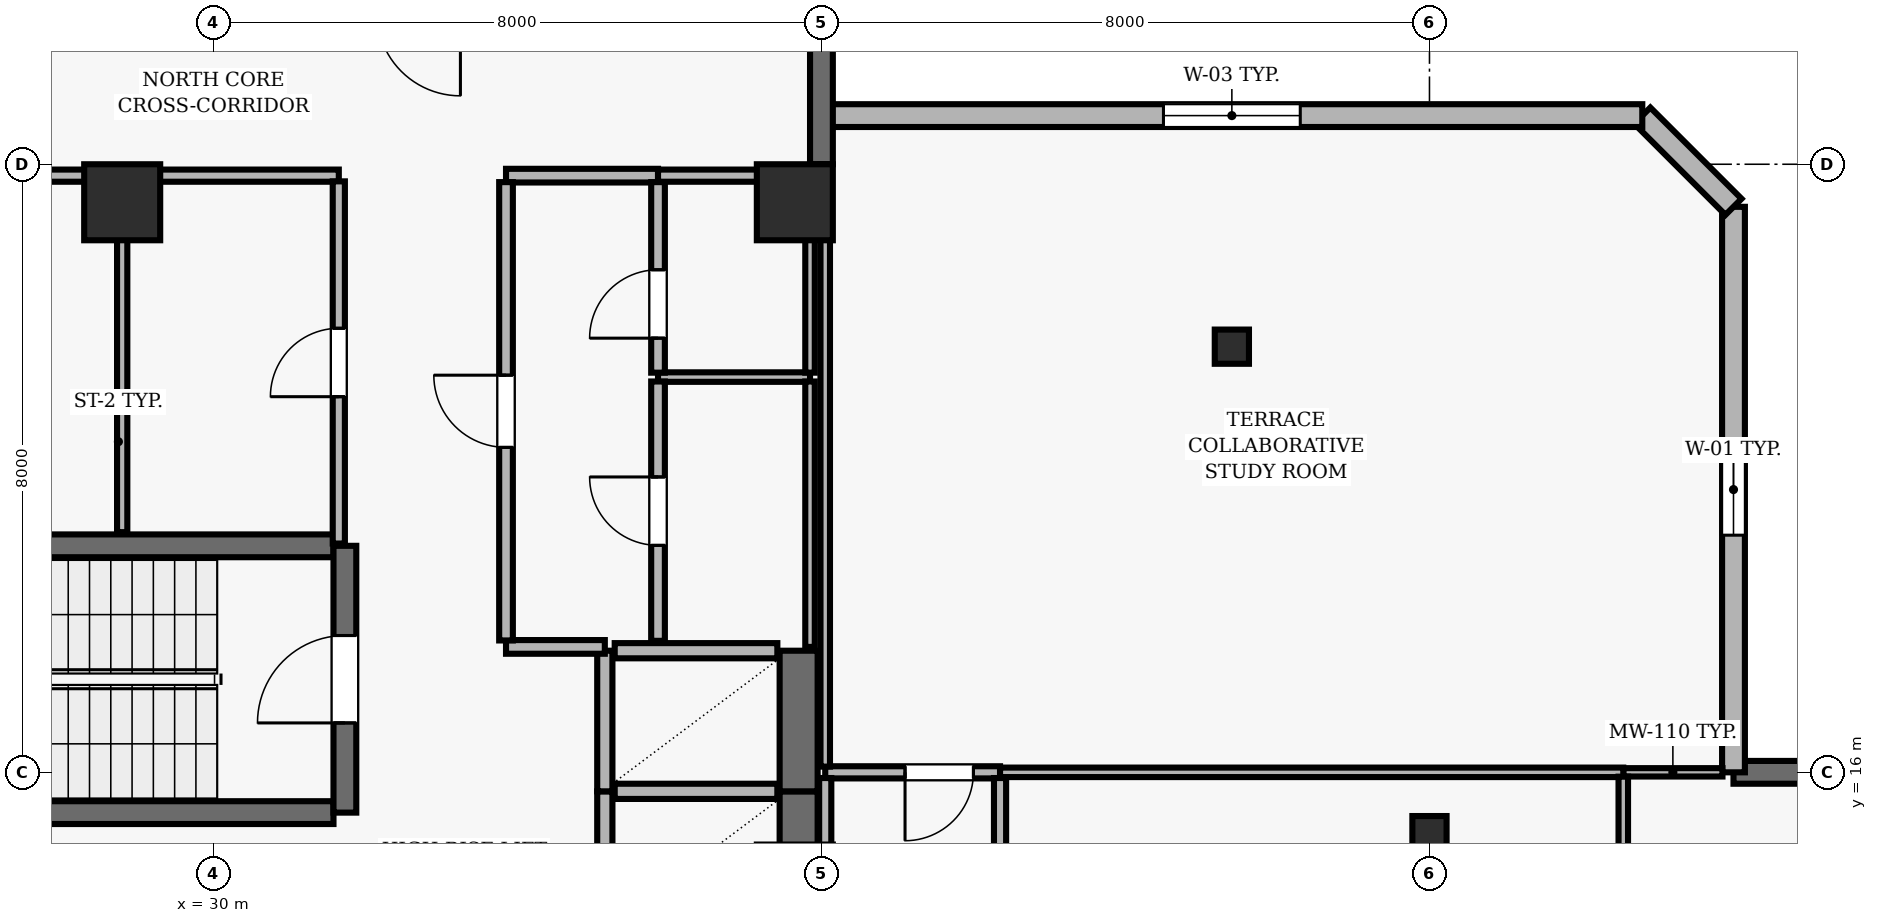
"""IFC4 building model, lengths in metres.
Left out: names, types, materials, properties, quantities, classifications, styles, units other than length and angle.
Written with IfcOpenShell. Run it as: python <this file> out.ifc"""

import sys

from ifc_helpers import new_model, si_unit, direction, frame, frame_2d, origin, origin_2d, place, context, subcontext, project, spatial, rectangle, hollow_rectangle, extrude, element, fill, save


model = new_model("IFC4")
c1 = context("Model", 3, precision=1e-05, world=origin(), true_north=direction((0.0, 1.0)))
c2 = subcontext(c1, "Body", "Model", "MODEL_VIEW")
j1 = project(units=[si_unit("LENGTHUNIT", "METRE"), si_unit("PLANEANGLEUNIT", "RADIAN")], contexts=[c1])
p1 = place(None, origin())
s1 = spatial("IfcSite", under=j1, at=p1, CompositionType="ELEMENT")
p2 = place(p1, origin())
s2 = spatial("IfcBuilding", under=s1, at=p2, CompositionType="ELEMENT")
p3 = place(p2, frame((0.0, 0.0, 179.7)))
s3 = spatial("IfcBuildingStorey", under=s2, at=p3, CompositionType="ELEMENT", Elevation=179.7)
for number, where, z_axis, x_axis in (
    (1, (28.8, 23.5, 0.0), (0.0, 0.0, 1.0), (1.0, 0.0, 0.0)),
    (2, (37.65, 23.5, 0.0), (0.0, 0.0, 1.0), (1.0, 0.0, 0.0)),
):
    element("IfcColumn", number, at=place(p3, frame(where, z_axis=z_axis, x_axis=x_axis)), inside=s3, PredefinedType="COLUMN", context=c2, shape_type="SweptSolid", body=[
        extrude(rectangle(XDim=1.0, YDim=1.0, at=origin_2d()), origin(), (0.0, 0.0, 1.0), 3.9),
    ])
for number, where, z_axis, x_axis in (
    (3, (46.0, 15.2, 0.0), (0.0, 0.0, 1.0), (1.0, 0.0, 0.0)),
    (4, (43.4, 21.6, 0.0), (0.0, 0.0, 1.0), (1.0, 0.0, 0.0)),
):
    element("IfcColumn", number, at=place(p3, frame(where, z_axis=z_axis, x_axis=x_axis)), inside=s3, PredefinedType="COLUMN", context=c2, shape_type="SweptSolid", body=[
        extrude(hollow_rectangle(XDim=0.45, YDim=0.45, WallThickness=0.02, at=origin_2d()), origin(), (0.0, 0.0, 1.0), 3.9),
    ])
p4 = place(p3, frame((62.7, 16.0, 0.0), z_axis=(0.0, 0.0, 1.0), x_axis=(-1.0, 0.0, 0.0)))
e5 = element("IfcWall", 5, at=p4, inside=s3, PredefinedType="SOLIDWALL", context=c2, shape_type="SweptSolid", body=[
    extrude(rectangle(XDim=12.7, YDim=0.3, at=frame_2d((6.35, 0.0))), origin(), (0.0, 0.0, 1.0), 3.69),
])
p5 = place(p4, frame((6.85, 0.0, 0.0)))
e6 = element("IfcOpeningElement", 6, at=p5, cuts=e5, PredefinedType="OPENING", context=c2, shape_type="SweptSolid", body=[
    extrude(rectangle(XDim=1.0, YDim=2.2, at=frame_2d((0.5, 1.1))), frame((0.0, 0.16, 0.0), z_axis=(0.0, -1.0, 0.0), x_axis=(1.0, 0.0, 0.0)), (0.0, 0.0, 1.0), 0.32),
])
p6 = place(p4, frame((1.225, 0.0, 0.9)))
e7 = element("IfcOpeningElement", 7, at=p6, cuts=e5, PredefinedType="OPENING", context=c2, shape_type="SweptSolid", body=[
    extrude(rectangle(XDim=3.0, YDim=2.2, at=frame_2d((1.5, 1.1))), frame((0.0, 0.16, 0.0), z_axis=(0.0, -1.0, 0.0), x_axis=(1.0, 0.0, 0.0)), (0.0, 0.0, 1.0), 0.32),
])
p7 = place(p4, frame((8.475, 0.0, 0.9)))
e8 = element("IfcOpeningElement", 8, at=p7, cuts=e5, PredefinedType="OPENING", context=c2, shape_type="SweptSolid", body=[
    extrude(rectangle(XDim=3.0, YDim=2.2, at=frame_2d((1.5, 1.1))), frame((0.0, 0.16, 0.0), z_axis=(0.0, -1.0, 0.0), x_axis=(1.0, 0.0, 0.0)), (0.0, 0.0, 1.0), 0.32),
])
p8 = place(p3, frame((50.0, 16.0, 0.0), z_axis=(0.0, 0.0, 1.0), x_axis=(0.0, 1.0, 0.0)))
e9 = element("IfcWall", 9, at=p8, inside=s3, PredefinedType="SOLIDWALL", context=c2, shape_type="SweptSolid", body=[
    extrude(rectangle(XDim=7.44, YDim=0.3, at=frame_2d((3.72, 0.0))), origin(), (0.0, 0.0, 1.0), 3.69),
])
p9 = place(p8, frame((3.12, 0.0, 0.9)))
e10 = element("IfcOpeningElement", 10, at=p9, cuts=e9, PredefinedType="OPENING", context=c2, shape_type="SweptSolid", body=[
    extrude(rectangle(XDim=1.2, YDim=1.6, at=frame_2d((0.6, 0.8))), frame((0.0, 0.16, 0.0), z_axis=(0.0, -1.0, 0.0), x_axis=(1.0, 0.0, 0.0)), (0.0, 0.0, 1.0), 0.32),
])
p10 = place(p3, frame((50.0, 23.44, 0.0), z_axis=(0.0, 0.0, 1.0), x_axis=(-0.707106781187, 0.707106781187, 0.0)))
e11 = element("IfcWall", 11, at=p10, inside=s3, PredefinedType="SOLIDWALL", context=c2, shape_type="SweptSolid", body=[
    extrude(rectangle(XDim=1.697, YDim=0.3, at=frame_2d((0.849, 0.0))), origin(), (0.0, 0.0, 1.0), 3.69),
])
p11 = place(p3, frame((48.8, 24.64, 0.0), z_axis=(0.0, 0.0, 1.0), x_axis=(-1.0, 0.0, 0.0)))
e12 = element("IfcWall", 12, at=p11, inside=s3, PredefinedType="SOLIDWALL", context=c2, shape_type="SweptSolid", body=[
    extrude(rectangle(XDim=10.8, YDim=0.3, at=frame_2d((5.4, 0.0))), origin(), (0.0, 0.0, 1.0), 3.69),
])
p12 = place(p11, frame((4.5, 0.0, 0.9)))
e13 = element("IfcOpeningElement", 13, at=p12, cuts=e12, PredefinedType="OPENING", context=c2, shape_type="SweptSolid", body=[
    extrude(rectangle(XDim=1.8, YDim=1.6, at=frame_2d((0.9, 0.8))), frame((0.0, 0.16, 0.0), z_axis=(0.0, -1.0, 0.0), x_axis=(1.0, 0.0, 0.0)), (0.0, 0.0, 1.0), 0.32),
])
p13 = place(p3, frame((38.0, 24.0, 0.0), z_axis=(0.0, 0.0, 1.0), x_axis=(0.0, 1.0, 0.0)))
e14 = element("IfcWall", 14, at=p13, inside=s3, PredefinedType="SOLIDWALL", context=c2, shape_type="SweptSolid", body=[
    extrude(rectangle(XDim=16.7, YDim=0.3, at=frame_2d((8.35, 0.0))), origin(), (0.0, 0.0, 1.0), 3.69),
])
p14 = place(p13, frame((2.03, 0.0, 0.0)))
e15 = element("IfcOpeningElement", 15, at=p14, cuts=e14, PredefinedType="OPENING", context=c2, shape_type="SweptSolid", body=[
    extrude(rectangle(XDim=1.0, YDim=2.2, at=frame_2d((0.5, 1.1))), frame((0.0, 0.16, 0.0), z_axis=(0.0, -1.0, 0.0), x_axis=(1.0, 0.0, 0.0)), (0.0, 0.0, 1.0), 0.32),
])
for number, where, z_axis, x_axis in (
    (16, (31.58, 18.98, 0.0), (0.0, 0.0, 1.0), (-1.0, 0.0, 0.0)),
    (17, (23.22, 15.47, 0.0), (0.0, 0.0, 1.0), (1.0, 0.0, 0.0)),
):
    element("IfcWall", number, at=place(p3, frame(where, z_axis=z_axis, x_axis=x_axis)), inside=s3, PredefinedType="SHEAR", context=c2, shape_type="SweptSolid", body=[
        extrude(rectangle(XDim=8.36, YDim=0.3, at=frame_2d((4.18, 0.0))), origin(), (0.0, 0.0, 1.0), 3.69),
    ])
p15 = place(p3, frame((31.73, 15.47, 0.0), z_axis=(0.0, 0.0, 1.0), x_axis=(0.0, 1.0, 0.0)))
e18 = element("IfcWall", 18, at=p15, inside=s3, PredefinedType="SHEAR", context=c2, shape_type="SweptSolid", body=[
    extrude(rectangle(XDim=3.51, YDim=0.3, at=frame_2d((1.755, 0.0))), origin(), (0.0, 0.0, 1.0), 3.69),
])
p16 = place(p15, frame((1.18, 0.0, 0.0)))
e19 = element("IfcOpeningElement", 19, at=p16, cuts=e18, PredefinedType="OPENING", context=c2, shape_type="SweptSolid", body=[
    extrude(rectangle(XDim=1.15, YDim=2.15, at=frame_2d((0.575, 1.075))), frame((0.0, 0.16, 0.0), z_axis=(0.0, -1.0, 0.0), x_axis=(1.0, 0.0, 0.0)), (0.0, 0.0, 1.0), 0.32),
])
p17 = place(p3, frame((35.15, 15.75, 0.0), z_axis=(0.0, 0.0, 1.0), x_axis=(0.0, -1.0, 0.0)))
e20 = element("IfcWall", 20, at=p17, inside=s3, PredefinedType="SOLIDWALL", context=c2, shape_type="SweptSolid", body=[
    extrude(rectangle(XDim=1.85, YDim=0.2, at=frame_2d((0.925, 0.0))), origin(), (0.0, 0.0, 1.0), 3.69),
])
p18 = place(p3, frame((37.7, 13.9, 0.0), z_axis=(0.0, 0.0, 1.0), x_axis=(0.0, 1.0, 0.0)))
e21 = element("IfcWall", 21, at=p18, inside=s3, PredefinedType="SHEAR", context=c2, shape_type="SweptSolid", body=[
    extrude(rectangle(XDim=1.85, YDim=0.5, at=frame_2d((0.925, 0.0))), origin(), (0.0, 0.0, 1.0), 3.69),
])
p19 = place(p3, frame((37.42, 15.75, 0.0), z_axis=(0.0, 0.0, 1.0), x_axis=(-1.0, 0.0, 0.0)))
e22 = element("IfcWall", 22, at=p19, inside=s3, PredefinedType="SOLIDWALL", context=c2, shape_type="SweptSolid", body=[
    extrude(rectangle(XDim=2.14, YDim=0.2, at=frame_2d((1.07, 0.0))), origin(), (0.0, 0.0, 1.0), 3.69),
])
p20 = place(p3, frame((35.15, 17.6, 0.0), z_axis=(0.0, 0.0, 1.0), x_axis=(0.0, -1.0, 0.0)))
e23 = element("IfcWall", 23, at=p20, inside=s3, PredefinedType="SOLIDWALL", context=c2, shape_type="SweptSolid", body=[
    extrude(rectangle(XDim=1.85, YDim=0.2, at=frame_2d((0.925, 0.0))), origin(), (0.0, 0.0, 1.0), 3.69),
])
p21 = place(p3, frame((37.7, 15.75, 0.0), z_axis=(0.0, 0.0, 1.0), x_axis=(0.0, 1.0, 0.0)))
e24 = element("IfcWall", 24, at=p21, inside=s3, PredefinedType="SHEAR", context=c2, shape_type="SweptSolid", body=[
    extrude(rectangle(XDim=1.85, YDim=0.5, at=frame_2d((0.925, 0.0))), origin(), (0.0, 0.0, 1.0), 3.69),
])
p22 = place(p3, frame((37.42, 17.6, 0.0), z_axis=(0.0, 0.0, 1.0), x_axis=(-1.0, 0.0, 0.0)))
e25 = element("IfcWall", 25, at=p22, inside=s3, PredefinedType="SOLIDWALL", context=c2, shape_type="SweptSolid", body=[
    extrude(rectangle(XDim=2.14, YDim=0.2, at=frame_2d((1.07, 0.0))), origin(), (0.0, 0.0, 1.0), 3.69),
])
p23 = place(p3, frame((28.8, 23.85, 0.0), z_axis=(0.0, 0.0, 1.0), x_axis=(-1.0, 0.0, 0.0)))
e26 = element("IfcWall", 26, at=p23, inside=s3, PredefinedType="PARTITIONING", context=c2, shape_type="SweptSolid", body=[
    extrude(rectangle(XDim=6.6, YDim=0.16, at=frame_2d((3.3, 0.0))), origin(), (0.0, 0.0, 1.0), 3.146),
])
p24 = place(p23, frame((2.86, 0.0, 0.0)))
e27 = element("IfcOpeningElement", 27, at=p24, cuts=e26, PredefinedType="OPENING", context=c2, shape_type="SweptSolid", body=[
    extrude(rectangle(XDim=0.88, YDim=2.1, at=frame_2d((0.44, 1.05))), frame((0.0, 0.09, 0.0), z_axis=(0.0, -1.0, 0.0), x_axis=(1.0, 0.0, 0.0)), (0.0, 0.0, 1.0), 0.18),
])
p25 = place(p3, frame((31.65, 23.85, 0.0), z_axis=(0.0, 0.0, 1.0), x_axis=(-1.0, 0.0, 0.0)))
e28 = element("IfcWall", 28, at=p25, inside=s3, PredefinedType="PARTITIONING", context=c2, shape_type="SweptSolid", body=[
    extrude(rectangle(XDim=2.85, YDim=0.16, at=frame_2d((1.425, 0.0))), origin(), (0.0, 0.0, 1.0), 3.146),
])
p26 = place(p3, frame((33.85, 17.65, 0.0), z_axis=(0.0, 0.0, 1.0), x_axis=(1.0, 0.0, 0.0)))
e29 = element("IfcWall", 29, at=p26, inside=s3, PredefinedType="PARTITIONING", context=c2, shape_type="SweptSolid", body=[
    extrude(rectangle(XDim=1.3, YDim=0.18, at=frame_2d((0.65, 0.0))), origin(), (0.0, 0.0, 1.0), 3.69),
])
p27 = place(p3, frame((35.85, 21.2, 0.0), z_axis=(0.0, 0.0, 1.0), x_axis=(1.0, 0.0, 0.0)))
e30 = element("IfcWall", 30, at=p27, inside=s3, PredefinedType="PARTITIONING", context=c2, shape_type="SweptSolid", body=[
    extrude(rectangle(XDim=2.0, YDim=0.125, at=frame_2d((1.0, 0.0))), origin(), (0.0, 0.0, 1.0), 3.146),
])
p28 = place(p3, frame((35.85, 23.85, 0.0), z_axis=(0.0, 0.0, 1.0), x_axis=(-1.0, 0.0, 0.0)))
e31 = element("IfcWall", 31, at=p28, inside=s3, PredefinedType="PARTITIONING", context=c2, shape_type="SweptSolid", body=[
    extrude(rectangle(XDim=2.0, YDim=0.18, at=frame_2d((1.0, 0.0))), origin(), (0.0, 0.0, 1.0), 3.146),
])
p29 = place(p3, frame((37.85, 23.85, 0.0), z_axis=(0.0, 0.0, 1.0), x_axis=(-1.0, 0.0, 0.0)))
e32 = element("IfcWall", 32, at=p29, inside=s3, PredefinedType="PARTITIONING", context=c2, shape_type="SweptSolid", body=[
    extrude(rectangle(XDim=2.0, YDim=0.16, at=frame_2d((1.0, 0.0))), origin(), (0.0, 0.0, 1.0), 3.146),
])
p30 = place(p3, frame((40.35, 16.0, 0.0), z_axis=(0.0, 0.0, 1.0), x_axis=(-1.0, 0.0, 0.0)))
e33 = element("IfcWall", 33, at=p30, inside=s3, PredefinedType="PARTITIONING", context=c2, shape_type="SweptSolid", body=[
    extrude(rectangle(XDim=2.3, YDim=0.16, at=frame_2d((1.15, 0.0))), origin(), (0.0, 0.0, 1.0), 3.69),
])
p31 = place(p30, frame((0.35, 0.0, 0.0)))
e34 = element("IfcOpeningElement", 34, at=p31, cuts=e33, PredefinedType="OPENING", context=c2, shape_type="SweptSolid", body=[
    extrude(rectangle(XDim=0.9, YDim=2.1, at=frame_2d((0.45, 1.05))), frame((0.0, 0.09, 0.0), z_axis=(0.0, -1.0, 0.0), x_axis=(1.0, 0.0, 0.0)), (0.0, 0.0, 1.0), 0.18),
])
p32 = place(p3, frame((48.55, 16.0, 0.0), z_axis=(0.0, 0.0, 1.0), x_axis=(1.0, 0.0, 0.0)))
e35 = element("IfcWall", 35, at=p32, inside=s3, PredefinedType="MOVABLE", context=c2, shape_type="SweptSolid", body=[
    extrude(rectangle(XDim=1.305, YDim=0.11, at=frame_2d((0.652, 0.0))), origin(), (0.0, 0.0, 1.0), 3.69),
])
p33 = place(p3, frame((48.55, 16.0, 0.0), z_axis=(0.0, 0.0, 1.0), x_axis=(-1.0, 0.0, 0.0)))
e36 = element("IfcWall", 36, at=p33, inside=s3, PredefinedType="PARTITIONING", context=c2, shape_type="SweptSolid", body=[
    extrude(rectangle(XDim=8.2, YDim=0.125, at=frame_2d((4.1, 0.0))), origin(), (0.0, 0.0, 1.0), 3.69),
])
p34 = place(p3, frame((28.8, 23.775, 0.0), z_axis=(0.0, 0.0, 1.0), x_axis=(0.0, -1.0, 0.0)))
e37 = element("IfcWall", 37, at=p34, inside=s3, PredefinedType="PARTITIONING", context=c2, shape_type="SweptSolid", body=[
    extrude(rectangle(XDim=4.615, YDim=0.135, at=frame_2d((2.308, 0.0))), origin(), (0.0, 0.0, 1.0), 3.69),
])
p35 = place(p3, frame((31.65, 19.01, 0.0), z_axis=(0.0, 0.0, 1.0), x_axis=(0.0, 1.0, 0.0)))
e38 = element("IfcWall", 38, at=p35, inside=s3, PredefinedType="PARTITIONING", context=c2, shape_type="SweptSolid", body=[
    extrude(rectangle(XDim=4.765, YDim=0.16, at=frame_2d((2.382, 0.0))), origin(), (0.0, 0.0, 1.0), 3.69),
])
p36 = place(p35, frame((1.932, 0.0, 0.0)))
e39 = element("IfcOpeningElement", 39, at=p36, cuts=e38, PredefinedType="OPENING", context=c2, shape_type="SweptSolid", body=[
    extrude(rectangle(XDim=0.9, YDim=2.1, at=frame_2d((0.45, 1.05))), frame((0.0, 0.09, 0.0), z_axis=(0.0, -1.0, 0.0), x_axis=(1.0, 0.0, 0.0)), (0.0, 0.0, 1.0), 0.18),
])
p37 = place(p3, frame((33.85, 17.735, 0.0), z_axis=(0.0, 0.0, 1.0), x_axis=(0.0, 1.0, 0.0)))
e40 = element("IfcWall", 40, at=p37, inside=s3, PredefinedType="PARTITIONING", context=c2, shape_type="SweptSolid", body=[
    extrude(rectangle(XDim=6.03, YDim=0.18, at=frame_2d((3.015, 0.0))), origin(), (0.0, 0.0, 1.0), 3.69),
])
p38 = place(p37, frame((2.54, 0.0, 0.0)))
e41 = element("IfcOpeningElement", 41, at=p38, cuts=e40, PredefinedType="OPENING", context=c2, shape_type="SweptSolid", body=[
    extrude(rectangle(XDim=0.95, YDim=2.1, at=frame_2d((0.475, 1.05))), frame((0.0, 0.1, 0.0), z_axis=(0.0, -1.0, 0.0), x_axis=(1.0, 0.0, 0.0)), (0.0, 0.0, 1.0), 0.2),
])
p39 = place(p3, frame((35.85, 17.73, 0.0), z_axis=(0.0, 0.0, 1.0), x_axis=(0.0, 1.0, 0.0)))
e42 = element("IfcWall", 42, at=p39, inside=s3, PredefinedType="PARTITIONING", context=c2, shape_type="SweptSolid", body=[
    extrude(rectangle(XDim=3.412, YDim=0.18, at=frame_2d((1.706, 0.0))), origin(), (0.0, 0.0, 1.0), 3.69),
])
p40 = place(p39, frame((1.256, 0.0, 0.0)))
e43 = element("IfcOpeningElement", 43, at=p40, cuts=e42, PredefinedType="OPENING", context=c2, shape_type="SweptSolid", body=[
    extrude(rectangle(XDim=0.9, YDim=2.1, at=frame_2d((0.45, 1.05))), frame((0.0, 0.1, 0.0), z_axis=(0.0, -1.0, 0.0), x_axis=(1.0, 0.0, 0.0)), (0.0, 0.0, 1.0), 0.2),
])
p41 = place(p3, frame((35.85, 21.258, 0.0), z_axis=(0.0, 0.0, 1.0), x_axis=(0.0, 1.0, 0.0)))
e44 = element("IfcWall", 44, at=p41, inside=s3, PredefinedType="PARTITIONING", context=c2, shape_type="SweptSolid", body=[
    extrude(rectangle(XDim=2.507, YDim=0.18, at=frame_2d((1.253, 0.0))), origin(), (0.0, 0.0, 1.0), 3.69),
])
p42 = place(p41, frame((0.454, 0.0, 0.0)))
e45 = element("IfcOpeningElement", 45, at=p42, cuts=e44, PredefinedType="OPENING", context=c2, shape_type="SweptSolid", body=[
    extrude(rectangle(XDim=0.9, YDim=2.1, at=frame_2d((0.45, 1.05))), frame((0.0, 0.1, 0.0), z_axis=(0.0, -1.0, 0.0), x_axis=(1.0, 0.0, 0.0)), (0.0, 0.0, 1.0), 0.2),
])
p43 = place(p3, frame((37.85, 17.65, 0.0), z_axis=(0.0, 0.0, 1.0), x_axis=(0.0, 1.0, 0.0)))
e46 = element("IfcWall", 46, at=p43, inside=s3, PredefinedType="PARTITIONING", context=c2, shape_type="SweptSolid", body=[
    extrude(rectangle(XDim=3.492, YDim=0.125, at=frame_2d((1.746, 0.0))), origin(), (0.0, 0.0, 1.0), 3.146),
])
p44 = place(p3, frame((37.85, 21.258, 0.0), z_axis=(0.0, 0.0, 1.0), x_axis=(0.0, 1.0, 0.0)))
e47 = element("IfcWall", 47, at=p44, inside=s3, PredefinedType="PARTITIONING", context=c2, shape_type="SweptSolid", body=[
    extrude(rectangle(XDim=2.517, YDim=0.125, at=frame_2d((1.258, 0.0))), origin(), (0.0, 0.0, 1.0), 3.146),
])
p45 = place(p3, frame((38.05, 15.925, 0.0), z_axis=(0.0, 0.0, 1.0), x_axis=(0.0, -1.0, 0.0)))
e48 = element("IfcWall", 48, at=p45, inside=s3, PredefinedType="PARTITIONING", context=c2, shape_type="SweptSolid", body=[
    extrude(rectangle(XDim=6.375, YDim=0.16, at=frame_2d((3.188, 0.0))), origin(), (0.0, 0.0, 1.0), 3.146),
])
p46 = place(p3, frame((38.05, 24.0, 0.0), z_axis=(0.0, 0.0, 1.0), x_axis=(0.0, -1.0, 0.0)))
e49 = element("IfcWall", 49, at=p46, inside=s3, PredefinedType="PARTITIONING", context=c2, shape_type="SweptSolid", body=[
    extrude(rectangle(XDim=7.925, YDim=0.125, at=frame_2d((3.962, 0.0))), origin(), (0.0, 0.0, 1.0), 3.146),
])
p47 = place(p3, frame((40.35, 7.625, 0.0), z_axis=(0.0, 0.0, 1.0), x_axis=(0.0, 1.0, 0.0)))
e50 = element("IfcWall", 50, at=p47, inside=s3, PredefinedType="PARTITIONING", context=c2, shape_type="SweptSolid", body=[
    extrude(rectangle(XDim=8.3, YDim=0.16, at=frame_2d((4.15, 0.0))), origin(), (0.0, 0.0, 1.0), 3.372),
])
p48 = place(p47, frame((3.65, 0.0, 0.0)))
e51 = element("IfcOpeningElement", 51, at=p48, cuts=e50, PredefinedType="OPENING", context=c2, shape_type="SweptSolid", body=[
    extrude(rectangle(XDim=1.0, YDim=2.1, at=frame_2d((0.5, 1.05))), frame((0.0, 0.09, 0.0), z_axis=(0.0, -1.0, 0.0), x_axis=(1.0, 0.0, 0.0)), (0.0, 0.0, 1.0), 0.18),
])
p49 = place(p3, frame((48.55, 7.625, 0.0), z_axis=(0.0, 0.0, 1.0), x_axis=(0.0, 1.0, 0.0)))
e52 = element("IfcWall", 52, at=p49, inside=s3, PredefinedType="PARTITIONING", context=c2, shape_type="SweptSolid", body=[
    extrude(rectangle(XDim=8.318, YDim=0.125, at=frame_2d((4.159, 0.0))), origin(), (0.0, 0.0, 1.0), 3.69),
])
p50 = place(p9, origin())
e53 = element("IfcWindow", 53, at=p50, inside=s3, PartitioningType="SINGLE_PANEL", PredefinedType="WINDOW", context=c2, shape_type="SweptSolid", body=[
    extrude(rectangle(XDim=1.2, YDim=1.6, at=frame_2d((0.6, 0.8))), frame((0.0, 0.03, 0.0), z_axis=(0.0, -1.0, 0.0), x_axis=(1.0, 0.0, 0.0)), (0.0, 0.0, 1.0), 0.06),
])
fill(e10, e53)
p51 = place(p12, origin())
e54 = element("IfcWindow", 54, at=p51, inside=s3, PartitioningType="SINGLE_PANEL", PredefinedType="WINDOW", context=c2, shape_type="SweptSolid", body=[
    extrude(rectangle(XDim=1.8, YDim=1.6, at=frame_2d((0.9, 0.8))), frame((0.0, 0.03, 0.0), z_axis=(0.0, -1.0, 0.0), x_axis=(1.0, 0.0, 0.0)), (0.0, 0.0, 1.0), 0.06),
])
fill(e13, e54)
p52 = place(p16, origin())
e55 = element("IfcDoor", 55, at=p52, inside=s3, OperationType="SINGLE_SWING_LEFT", PredefinedType="DOOR", context=c2, shape_type="SweptSolid", body=[
    extrude(rectangle(XDim=1.15, YDim=2.15, at=frame_2d((0.575, 1.075))), frame((0.0, 0.025, 0.0), z_axis=(0.0, -1.0, 0.0), x_axis=(1.0, 0.0, 0.0)), (0.0, 0.0, 1.0), 0.05),
])
fill(e19, e55)
p53 = place(p38, origin())
e56 = element("IfcDoor", 56, at=p53, inside=s3, OperationType="SINGLE_SWING_RIGHT", PredefinedType="DOOR", context=c2, shape_type="SweptSolid", body=[
    extrude(rectangle(XDim=0.95, YDim=2.1, at=frame_2d((0.475, 1.05))), frame((0.0, 0.025, 0.0), z_axis=(0.0, -1.0, 0.0), x_axis=(1.0, 0.0, 0.0)), (0.0, 0.0, 1.0), 0.05),
])
fill(e41, e56)
p54 = place(p42, origin())
e57 = element("IfcDoor", 57, at=p54, inside=s3, OperationType="SINGLE_SWING_LEFT", PredefinedType="DOOR", context=c2, shape_type="SweptSolid", body=[
    extrude(rectangle(XDim=0.9, YDim=2.1, at=frame_2d((0.45, 1.05))), frame((0.0, 0.025, 0.0), z_axis=(0.0, -1.0, 0.0), x_axis=(1.0, 0.0, 0.0)), (0.0, 0.0, 1.0), 0.05),
])
fill(e45, e57)
p55 = place(p40, origin())
e58 = element("IfcDoor", 58, at=p55, inside=s3, OperationType="SINGLE_SWING_RIGHT", PredefinedType="DOOR", context=c2, shape_type="SweptSolid", body=[
    extrude(rectangle(XDim=0.9, YDim=2.1, at=frame_2d((0.45, 1.05))), frame((0.0, 0.025, 0.0), z_axis=(0.0, -1.0, 0.0), x_axis=(1.0, 0.0, 0.0)), (0.0, 0.0, 1.0), 0.05),
])
fill(e43, e58)
p56 = place(p36, origin())
e59 = element("IfcDoor", 59, at=p56, inside=s3, OperationType="SINGLE_SWING_LEFT", PredefinedType="DOOR", context=c2, shape_type="SweptSolid", body=[
    extrude(rectangle(XDim=0.9, YDim=2.1, at=frame_2d((0.45, 1.05))), frame((0.0, 0.025, 0.0), z_axis=(0.0, -1.0, 0.0), x_axis=(1.0, 0.0, 0.0)), (0.0, 0.0, 1.0), 0.05),
])
fill(e39, e59)
p57 = place(p31, origin())
e60 = element("IfcDoor", 60, at=p57, inside=s3, OperationType="SINGLE_SWING_RIGHT", PredefinedType="DOOR", context=c2, shape_type="SweptSolid", body=[
    extrude(rectangle(XDim=0.9, YDim=2.1, at=frame_2d((0.45, 1.05))), frame((0.0, 0.025, 0.0), z_axis=(0.0, -1.0, 0.0), x_axis=(1.0, 0.0, 0.0)), (0.0, 0.0, 1.0), 0.05),
])
fill(e34, e60)
save(model, sys.argv[1])
